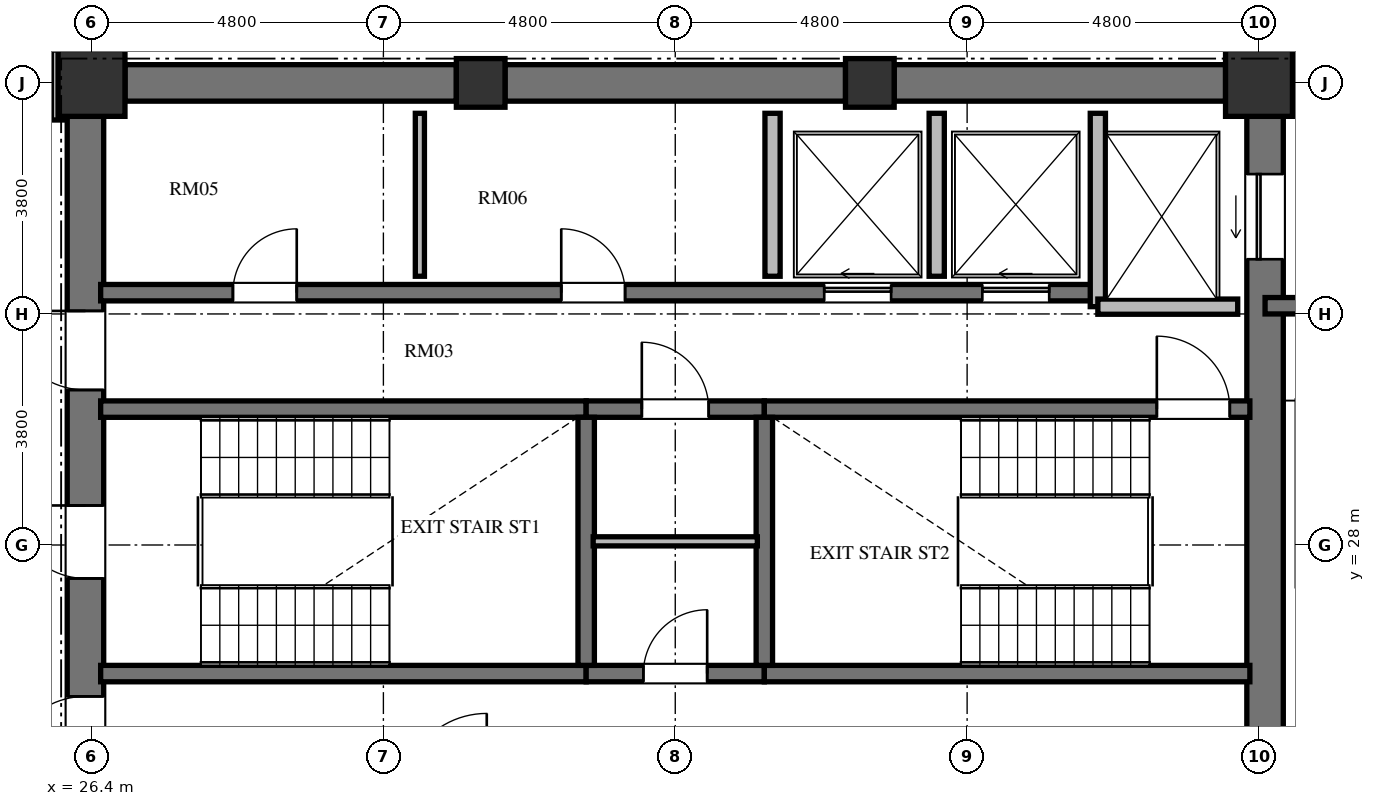
"""IFC4 building model, lengths in metres.
Left out: names, types, materials, properties, quantities, classifications, styles, units other than length and angle.
Written with IfcOpenShell. Run it as: python <this file> out.ifc"""

import sys

from ifc_helpers import new_model, si_unit, direction, frame, frame_2d, origin, origin_2d, place, context, subcontext, project, spatial, rectangle, extrude, element, fill, save


model = new_model("IFC4")
c1 = context("Model", 3, precision=1e-05, world=origin(), true_north=direction((0.0, 1.0)))
c2 = subcontext(c1, "Body", "Model", "MODEL_VIEW")
j1 = project(units=[si_unit("LENGTHUNIT", "METRE"), si_unit("PLANEANGLEUNIT", "RADIAN")], contexts=[c1])
p1 = place(None, origin())
s1 = spatial("IfcSite", under=j1, at=p1, CompositionType="ELEMENT")
p2 = place(p1, origin())
s2 = spatial("IfcBuilding", under=s1, at=p2, CompositionType="ELEMENT")
p3 = place(p2, frame((0.0, 0.0, 202.128)))
s3 = spatial("IfcBuildingStorey", under=s2, at=p3, CompositionType="ELEMENT", Elevation=202.128)
p4 = place(p3, frame((45.6, 35.6, 0.0), z_axis=(0.0, 0.0, 1.0), x_axis=(1.0, 0.0, 0.0)))
e1 = element("IfcColumn", 1, at=p4, inside=s3, PredefinedType="COLUMN", context=c2, shape_type="SweptSolid", body=[
    extrude(rectangle(XDim=1.1, YDim=1.1, at=origin_2d()), origin(), (0.0, 0.0, 1.0), 3.648),
])
for number, where, z_axis, x_axis in (
    (2, (39.2, 35.6, 0.0), (0.0, 0.0, 1.0), (1.0, 0.0, 0.0)),
    (3, (32.8, 35.6, 0.0), (0.0, 0.0, 1.0), (1.0, 0.0, 0.0)),
):
    element("IfcColumn", number, at=place(p3, frame(where, z_axis=z_axis, x_axis=x_axis)), inside=s3, PredefinedType="COLUMN", context=c2, shape_type="SweptSolid", body=[
        extrude(rectangle(XDim=0.8, YDim=0.8, at=origin_2d()), origin(), (0.0, 0.0, 1.0), 3.648),
    ])
p5 = place(p3, frame((26.4, 35.6, 0.0), z_axis=(0.0, 0.0, 1.0), x_axis=(1.0, 0.0, 0.0)))
e4 = element("IfcColumn", 4, at=p5, inside=s3, PredefinedType="COLUMN", context=c2, shape_type="SweptSolid", body=[
    extrude(rectangle(XDim=1.1, YDim=1.1, at=origin_2d()), origin(), (0.0, 0.0, 1.0), 3.648),
])
p6 = place(p3, frame((26.3, 20.95, 0.0), z_axis=(0.0, 0.0, 1.0), x_axis=(0.0, 1.0, 0.0)))
e5 = element("IfcWall", 5, at=p6, inside=s3, PredefinedType="SHEAR", context=c2, shape_type="SweptSolid", body=[
    extrude(rectangle(XDim=14.1, YDim=0.6, at=frame_2d((7.05, 0.0))), origin(), (0.0, 0.0, 1.0), 3.648),
])
p7 = place(p6, frame((6.5, 0.0, 0.0)))
e6 = element("IfcOpeningElement", 6, at=p7, cuts=e5, PredefinedType="OPENING", context=c2, shape_type="SweptSolid", body=[
    extrude(rectangle(XDim=1.2, YDim=2.15, at=frame_2d((0.6, 1.075))), frame((0.0, 0.31, 0.0), z_axis=(0.0, -1.0, 0.0), x_axis=(1.0, 0.0, 0.0)), (0.0, 0.0, 1.0), 0.62),
])
p8 = place(p6, frame((9.6, 0.0, 0.0)))
e7 = element("IfcOpeningElement", 7, at=p8, cuts=e5, PredefinedType="OPENING", context=c2, shape_type="SweptSolid", body=[
    extrude(rectangle(XDim=1.3, YDim=2.2, at=frame_2d((0.65, 1.1))), frame((0.0, 0.31, 0.0), z_axis=(0.0, -1.0, 0.0), x_axis=(1.0, 0.0, 0.0)), (0.0, 0.0, 1.0), 0.62),
])
p9 = place(p6, frame((3.26, 0.0, 0.0)))
e8 = element("IfcOpeningElement", 8, at=p9, cuts=e5, PredefinedType="OPENING", context=c2, shape_type="SweptSolid", body=[
    extrude(rectangle(XDim=1.3, YDim=2.2, at=frame_2d((0.65, 1.1))), frame((0.0, 0.31, 0.0), z_axis=(0.0, -1.0, 0.0), x_axis=(1.0, 0.0, 0.0)), (0.0, 0.0, 1.0), 0.62),
])
p10 = place(p3, frame((45.7, 20.95, 0.0), z_axis=(0.0, 0.0, 1.0), x_axis=(0.0, 1.0, 0.0)))
e9 = element("IfcWall", 9, at=p10, inside=s3, PredefinedType="SHEAR", context=c2, shape_type="SweptSolid", body=[
    extrude(rectangle(XDim=14.1, YDim=0.6, at=frame_2d((7.05, 0.0))), origin(), (0.0, 0.0, 1.0), 3.648),
])
p11 = place(p10, frame((11.75, 0.0, 0.0)))
e10 = element("IfcOpeningElement", 10, at=p11, cuts=e9, PredefinedType="OPENING", context=c2, shape_type="SweptSolid", body=[
    extrude(rectangle(XDim=1.4, YDim=2.3, at=frame_2d((0.7, 1.15))), frame((0.0, 0.31, 0.0), z_axis=(0.0, -1.0, 0.0), x_axis=(1.0, 0.0, 0.0)), (0.0, 0.0, 1.0), 0.62),
])
p12 = place(p10, frame((0.95, 0.0, 0.0)))
e11 = element("IfcOpeningElement", 11, at=p12, cuts=e9, PredefinedType="OPENING", context=c2, shape_type="SweptSolid", body=[
    extrude(rectangle(XDim=1.4, YDim=2.3, at=frame_2d((0.7, 1.15))), frame((0.0, 0.31, 0.0), z_axis=(0.0, -1.0, 0.0), x_axis=(1.0, 0.0, 0.0)), (0.0, 0.0, 1.0), 0.62),
])
p13 = place(p3, frame((26.95, 35.6, 0.0), z_axis=(0.0, 0.0, 1.0), x_axis=(1.0, 0.0, 0.0)))
e12 = element("IfcWall", 12, at=p13, inside=s3, PredefinedType="SHEAR", context=c2, shape_type="SweptSolid", body=[
    extrude(rectangle(XDim=5.45, YDim=0.6, at=frame_2d((2.725, 0.0))), origin(), (0.0, 0.0, 1.0), 3.648),
])
p14 = place(p3, frame((33.2, 35.6, 0.0), z_axis=(0.0, 0.0, 1.0), x_axis=(1.0, 0.0, 0.0)))
e13 = element("IfcWall", 13, at=p14, inside=s3, PredefinedType="SHEAR", context=c2, shape_type="SweptSolid", body=[
    extrude(rectangle(XDim=5.6, YDim=0.6, at=frame_2d((2.8, 0.0))), origin(), (0.0, 0.0, 1.0), 3.648),
])
p15 = place(p3, frame((39.6, 35.6, 0.0), z_axis=(0.0, 0.0, 1.0), x_axis=(1.0, 0.0, 0.0)))
e14 = element("IfcWall", 14, at=p15, inside=s3, PredefinedType="SHEAR", context=c2, shape_type="SweptSolid", body=[
    extrude(rectangle(XDim=5.45, YDim=0.6, at=frame_2d((2.725, 0.0))), origin(), (0.0, 0.0, 1.0), 3.648),
])
p16 = place(p3, frame((26.55, 30.235, 0.0), z_axis=(0.0, 0.0, 1.0), x_axis=(1.0, 0.0, 0.0)))
e15 = element("IfcWall", 15, at=p16, inside=s3, PredefinedType="SHEAR", context=c2, shape_type="SweptSolid", body=[
    extrude(rectangle(XDim=7.985, YDim=0.27, at=frame_2d((3.992, 0.0))), origin(), (0.0, 0.0, 1.0), 3.648),
])
p17 = place(p3, frame((34.535, 30.235, 0.0), z_axis=(0.0, 0.0, 1.0), x_axis=(1.0, 0.0, 0.0)))
e16 = element("IfcWall", 16, at=p17, inside=s3, PredefinedType="SHEAR", context=c2, shape_type="SweptSolid", body=[
    extrude(rectangle(XDim=2.93, YDim=0.27, at=frame_2d((1.465, 0.0))), origin(), (0.0, 0.0, 1.0), 3.648),
])
p18 = place(p17, frame((0.915, 0.0, 0.0)))
e17 = element("IfcOpeningElement", 17, at=p18, cuts=e16, PredefinedType="OPENING", context=c2, shape_type="SweptSolid", body=[
    extrude(rectangle(XDim=1.1, YDim=2.15, at=frame_2d((0.55, 1.075))), frame((0.0, 0.145, 0.0), z_axis=(0.0, -1.0, 0.0), x_axis=(1.0, 0.0, 0.0)), (0.0, 0.0, 1.0), 0.29),
])
p19 = place(p3, frame((37.465, 30.235, 0.0), z_axis=(0.0, 0.0, 1.0), x_axis=(1.0, 0.0, 0.0)))
e18 = element("IfcWall", 18, at=p19, inside=s3, PredefinedType="SHEAR", context=c2, shape_type="SweptSolid", body=[
    extrude(rectangle(XDim=7.985, YDim=0.27, at=frame_2d((3.992, 0.0))), origin(), (0.0, 0.0, 1.0), 3.648),
])
p20 = place(p19, frame((6.455, 0.0, 0.0)))
e19 = element("IfcOpeningElement", 19, at=p20, cuts=e18, PredefinedType="OPENING", context=c2, shape_type="SweptSolid", body=[
    extrude(rectangle(XDim=1.2, YDim=2.15, at=frame_2d((0.6, 1.075))), frame((0.0, 0.145, 0.0), z_axis=(0.0, -1.0, 0.0), x_axis=(1.0, 0.0, 0.0)), (0.0, 0.0, 1.0), 0.29),
])
p21 = place(p3, frame((26.55, 25.885, 0.0), z_axis=(0.0, 0.0, 1.0), x_axis=(1.0, 0.0, 0.0)))
e20 = element("IfcWall", 20, at=p21, inside=s3, PredefinedType="SHEAR", context=c2, shape_type="SweptSolid", body=[
    extrude(rectangle(XDim=7.985, YDim=0.27, at=frame_2d((3.992, 0.0))), origin(), (0.0, 0.0, 1.0), 3.648),
])
p22 = place(p3, frame((34.535, 25.885, 0.0), z_axis=(0.0, 0.0, 1.0), x_axis=(1.0, 0.0, 0.0)))
e21 = element("IfcWall", 21, at=p22, inside=s3, PredefinedType="SHEAR", context=c2, shape_type="SweptSolid", body=[
    extrude(rectangle(XDim=2.93, YDim=0.27, at=frame_2d((1.465, 0.0))), origin(), (0.0, 0.0, 1.0), 3.648),
])
p23 = place(p22, frame((0.94, 0.0, 0.0)))
e22 = element("IfcOpeningElement", 22, at=p23, cuts=e21, PredefinedType="OPENING", context=c2, shape_type="SweptSolid", body=[
    extrude(rectangle(XDim=1.05, YDim=2.15, at=frame_2d((0.525, 1.075))), frame((0.0, 0.145, 0.0), z_axis=(0.0, -1.0, 0.0), x_axis=(1.0, 0.0, 0.0)), (0.0, 0.0, 1.0), 0.29),
])
p24 = place(p3, frame((37.465, 25.885, 0.0), z_axis=(0.0, 0.0, 1.0), x_axis=(1.0, 0.0, 0.0)))
e23 = element("IfcWall", 23, at=p24, inside=s3, PredefinedType="SHEAR", context=c2, shape_type="SweptSolid", body=[
    extrude(rectangle(XDim=7.985, YDim=0.27, at=frame_2d((3.992, 0.0))), origin(), (0.0, 0.0, 1.0), 3.648),
])
for number, where, z_axis, x_axis in (
    (24, (34.535, 26.02, 0.0), (0.0, 0.0, 1.0), (0.0, 1.0, 0.0)),
    (25, (37.465, 26.02, 0.0), (0.0, 0.0, 1.0), (0.0, 1.0, 0.0)),
):
    element("IfcWall", number, at=place(p3, frame(where, z_axis=z_axis, x_axis=x_axis)), inside=s3, PredefinedType="SHEAR", context=c2, shape_type="SweptSolid", body=[
        extrude(rectangle(XDim=4.08, YDim=0.27, at=frame_2d((2.04, 0.0))), origin(), (0.0, 0.0, 1.0), 3.648),
    ])
p25 = place(p3, frame((34.65, 28.06, 0.0), z_axis=(0.0, 0.0, 1.0), x_axis=(1.0, 0.0, 0.0)))
e26 = element("IfcWall", 26, at=p25, inside=s3, PredefinedType="PARTITIONING", context=c2, shape_type="SweptSolid", body=[
    extrude(rectangle(XDim=2.7, YDim=0.15, at=frame_2d((1.35, 0.0))), origin(), (0.0, 0.0, 1.0), 3.448),
])
p26 = place(p3, frame((26.55, 32.15, 0.0), z_axis=(0.0, 0.0, 1.0), x_axis=(1.0, 0.0, 0.0)))
e27 = element("IfcWall", 27, at=p26, inside=s3, PredefinedType="SHEAR", context=c2, shape_type="SweptSolid", body=[
    extrude(rectangle(XDim=16.4, YDim=0.27, at=frame_2d((8.2, 0.0))), origin(), (0.0, 0.0, 1.0), 3.648),
])
p27 = place(p26, frame((2.175, 0.0, 0.0)))
e28 = element("IfcOpeningElement", 28, at=p27, cuts=e27, PredefinedType="OPENING", context=c2, shape_type="SweptSolid", body=[
    extrude(rectangle(XDim=1.05, YDim=2.15, at=frame_2d((0.525, 1.075))), frame((0.0, 0.145, 0.0), z_axis=(0.0, -1.0, 0.0), x_axis=(1.0, 0.0, 0.0)), (0.0, 0.0, 1.0), 0.29),
])
p28 = place(p26, frame((7.575, 0.0, 0.0)))
e29 = element("IfcOpeningElement", 29, at=p28, cuts=e27, PredefinedType="OPENING", context=c2, shape_type="SweptSolid", body=[
    extrude(rectangle(XDim=1.05, YDim=2.15, at=frame_2d((0.525, 1.075))), frame((0.0, 0.145, 0.0), z_axis=(0.0, -1.0, 0.0), x_axis=(1.0, 0.0, 0.0)), (0.0, 0.0, 1.0), 0.29),
])
p29 = place(p26, frame((11.9, 0.0, 0.0)))
e30 = element("IfcOpeningElement", 30, at=p29, cuts=e27, PredefinedType="OPENING", context=c2, shape_type="SweptSolid", body=[
    extrude(rectangle(XDim=1.1, YDim=2.2, at=frame_2d((0.55, 1.1))), frame((0.0, 0.145, 0.0), z_axis=(0.0, -1.0, 0.0), x_axis=(1.0, 0.0, 0.0)), (0.0, 0.0, 1.0), 0.29),
])
p30 = place(p26, frame((14.5, 0.0, 0.0)))
e31 = element("IfcOpeningElement", 31, at=p30, cuts=e27, PredefinedType="OPENING", context=c2, shape_type="SweptSolid", body=[
    extrude(rectangle(XDim=1.1, YDim=2.2, at=frame_2d((0.55, 1.1))), frame((0.0, 0.145, 0.0), z_axis=(0.0, -1.0, 0.0), x_axis=(1.0, 0.0, 0.0)), (0.0, 0.0, 1.0), 0.29),
])
p31 = place(p3, frame((42.95, 31.92, 0.0), z_axis=(0.0, 0.0, 1.0), x_axis=(0.0, 1.0, 0.0)))
e32 = element("IfcWall", 32, at=p31, inside=s3, PredefinedType="SOLIDWALL", context=c2, shape_type="SweptSolid", body=[
    extrude(rectangle(XDim=3.18, YDim=0.25, at=frame_2d((1.59, 0.0))), origin(), (0.0, 0.0, 1.0), 3.448),
])
p32 = place(p3, frame((42.95, 31.92, 0.0), z_axis=(0.0, 0.0, 1.0), x_axis=(1.0, 0.0, 0.0)))
e33 = element("IfcWall", 33, at=p32, inside=s3, PredefinedType="SOLIDWALL", context=c2, shape_type="SweptSolid", body=[
    extrude(rectangle(XDim=2.3, YDim=0.25, at=frame_2d((1.15, 0.0))), origin(), (0.0, 0.0, 1.0), 3.448),
])
for number, where, z_axis, x_axis in (
    (34, (37.6, 32.42, 0.0), (0.0, 0.0, 1.0), (0.0, 1.0, 0.0)),
    (35, (40.3, 32.42, 0.0), (0.0, 0.0, 1.0), (0.0, 1.0, 0.0)),
):
    element("IfcWall", number, at=place(p3, frame(where, z_axis=z_axis, x_axis=x_axis)), inside=s3, PredefinedType="SOLIDWALL", context=c2, shape_type="SweptSolid", body=[
        extrude(rectangle(XDim=2.68, YDim=0.25, at=frame_2d((1.34, 0.0))), origin(), (0.0, 0.0, 1.0), 3.448),
    ])
p33 = place(p3, frame((31.8, 32.42, 0.0), z_axis=(0.0, 0.0, 1.0), x_axis=(0.0, 1.0, 0.0)))
e36 = element("IfcWall", 36, at=p33, inside=s3, PredefinedType="PARTITIONING", context=c2, shape_type="SweptSolid", body=[
    extrude(rectangle(XDim=2.68, YDim=0.15, at=frame_2d((1.34, 0.0))), origin(), (0.0, 0.0, 1.0), 3.448),
])
p34 = place(p3, frame((46.0, 35.98, 0.0), z_axis=(0.0, 0.0, 1.0), x_axis=(1.0, 0.0, 0.0)))
e37 = element("IfcWall", 37, at=p34, inside=s3, PredefinedType="SHEAR", context=c2, shape_type="SweptSolid", body=[
    extrude(rectangle(XDim=4.55, YDim=0.27, at=frame_2d((2.275, 0.0))), origin(), (0.0, 0.0, 1.0), 3.648),
])
p35 = place(p3, frame((45.7, 31.935, 0.0), z_axis=(0.0, 0.0, 1.0), x_axis=(1.0, 0.0, 0.0)))
e38 = element("IfcWall", 38, at=p35, inside=s3, PredefinedType="SHEAR", context=c2, shape_type="SweptSolid", body=[
    extrude(rectangle(XDim=4.715, YDim=0.27, at=frame_2d((2.357, 0.0))), origin(), (0.0, 0.0, 1.0), 3.648),
])
p36 = place(p3, frame((25.83, 36.14, 0.0), z_axis=(0.0, 0.0, 1.0), x_axis=(0.0, -1.0, 0.0)))
e39 = element("IfcWall", 39, at=p36, inside=s3, PredefinedType="PARTITIONING", context=c2, shape_type="SweptSolid", body=[
    extrude(rectangle(XDim=1.15, YDim=0.18, at=frame_2d((0.575, 0.0))), origin(), (0.0, 0.0, 1.0), 3.448),
])
p37 = place(p7, origin())
e40 = element("IfcDoor", 40, at=p37, inside=s3, OperationType="SINGLE_SWING_RIGHT", PredefinedType="DOOR", context=c2, shape_type="SweptSolid", body=[
    extrude(rectangle(XDim=1.2, YDim=2.15, at=frame_2d((0.6, 1.075))), frame((0.0, 0.025, 0.0), z_axis=(0.0, -1.0, 0.0), x_axis=(1.0, 0.0, 0.0)), (0.0, 0.0, 1.0), 0.05),
])
fill(e6, e40)
p38 = place(p20, origin())
e41 = element("IfcDoor", 41, at=p38, inside=s3, OperationType="SINGLE_SWING_LEFT", PredefinedType="DOOR", context=c2, shape_type="SweptSolid", body=[
    extrude(rectangle(XDim=1.2, YDim=2.15, at=frame_2d((0.6, 1.075))), frame((0.0, 0.025, 0.0), z_axis=(0.0, -1.0, 0.0), x_axis=(1.0, 0.0, 0.0)), (0.0, 0.0, 1.0), 0.05),
])
fill(e19, e41)
p39 = place(p23, origin())
e42 = element("IfcDoor", 42, at=p39, inside=s3, OperationType="SINGLE_SWING_RIGHT", PredefinedType="DOOR", context=c2, shape_type="SweptSolid", body=[
    extrude(rectangle(XDim=1.05, YDim=2.15, at=frame_2d((0.525, 1.075))), frame((0.0, 0.025, 0.0), z_axis=(0.0, -1.0, 0.0), x_axis=(1.0, 0.0, 0.0)), (0.0, 0.0, 1.0), 0.05),
])
fill(e22, e42)
p40 = place(p18, origin())
e43 = element("IfcDoor", 43, at=p40, inside=s3, OperationType="SINGLE_SWING_LEFT", PredefinedType="DOOR", context=c2, shape_type="SweptSolid", body=[
    extrude(rectangle(XDim=1.1, YDim=2.15, at=frame_2d((0.55, 1.075))), frame((0.0, 0.025, 0.0), z_axis=(0.0, -1.0, 0.0), x_axis=(1.0, 0.0, 0.0)), (0.0, 0.0, 1.0), 0.05),
])
fill(e17, e43)
p41 = place(p8, origin())
e44 = element("IfcDoor", 44, at=p41, inside=s3, OperationType="SINGLE_SWING_RIGHT", PredefinedType="DOOR", context=c2, shape_type="SweptSolid", body=[
    extrude(rectangle(XDim=1.3, YDim=2.2, at=frame_2d((0.65, 1.1))), frame((0.0, 0.025, 0.0), z_axis=(0.0, -1.0, 0.0), x_axis=(1.0, 0.0, 0.0)), (0.0, 0.0, 1.0), 0.05),
])
fill(e7, e44)
p42 = place(p9, origin())
e45 = element("IfcDoor", 45, at=p42, inside=s3, OperationType="SINGLE_SWING_LEFT", PredefinedType="DOOR", context=c2, shape_type="SweptSolid", body=[
    extrude(rectangle(XDim=1.3, YDim=2.2, at=frame_2d((0.65, 1.1))), frame((0.0, 0.025, 0.0), z_axis=(0.0, -1.0, 0.0), x_axis=(1.0, 0.0, 0.0)), (0.0, 0.0, 1.0), 0.05),
])
fill(e8, e45)
p43 = place(p27, origin())
e46 = element("IfcDoor", 46, at=p43, inside=s3, OperationType="SINGLE_SWING_RIGHT", PredefinedType="DOOR", context=c2, shape_type="SweptSolid", body=[
    extrude(rectangle(XDim=1.05, YDim=2.15, at=frame_2d((0.525, 1.075))), frame((0.0, 0.025, 0.0), z_axis=(0.0, -1.0, 0.0), x_axis=(1.0, 0.0, 0.0)), (0.0, 0.0, 1.0), 0.05),
])
fill(e28, e46)
p44 = place(p28, origin())
e47 = element("IfcDoor", 47, at=p44, inside=s3, OperationType="SINGLE_SWING_LEFT", PredefinedType="DOOR", context=c2, shape_type="SweptSolid", body=[
    extrude(rectangle(XDim=1.05, YDim=2.15, at=frame_2d((0.525, 1.075))), frame((0.0, 0.025, 0.0), z_axis=(0.0, -1.0, 0.0), x_axis=(1.0, 0.0, 0.0)), (0.0, 0.0, 1.0), 0.05),
])
fill(e29, e47)
p45 = place(p29, origin())
e48 = element("IfcDoor", 48, at=p45, inside=s3, OperationType="SLIDING_TO_LEFT", PredefinedType="DOOR", context=c2, shape_type="SweptSolid", body=[
    extrude(rectangle(XDim=1.1, YDim=2.2, at=frame_2d((0.55, 1.1))), frame((0.0, 0.025, 0.0), z_axis=(0.0, -1.0, 0.0), x_axis=(1.0, 0.0, 0.0)), (0.0, 0.0, 1.0), 0.05),
])
fill(e30, e48)
p46 = place(p30, origin())
e49 = element("IfcDoor", 49, at=p46, inside=s3, OperationType="SLIDING_TO_LEFT", PredefinedType="DOOR", context=c2, shape_type="SweptSolid", body=[
    extrude(rectangle(XDim=1.1, YDim=2.2, at=frame_2d((0.55, 1.1))), frame((0.0, 0.025, 0.0), z_axis=(0.0, -1.0, 0.0), x_axis=(1.0, 0.0, 0.0)), (0.0, 0.0, 1.0), 0.05),
])
fill(e31, e49)
p47 = place(p11, origin())
e50 = element("IfcDoor", 50, at=p47, inside=s3, OperationType="SLIDING_TO_LEFT", PredefinedType="DOOR", context=c2, shape_type="SweptSolid", body=[
    extrude(rectangle(XDim=1.4, YDim=2.3, at=frame_2d((0.7, 1.15))), frame((0.0, 0.025, 0.0), z_axis=(0.0, -1.0, 0.0), x_axis=(1.0, 0.0, 0.0)), (0.0, 0.0, 1.0), 0.05),
])
fill(e10, e50)
save(model, sys.argv[1])
